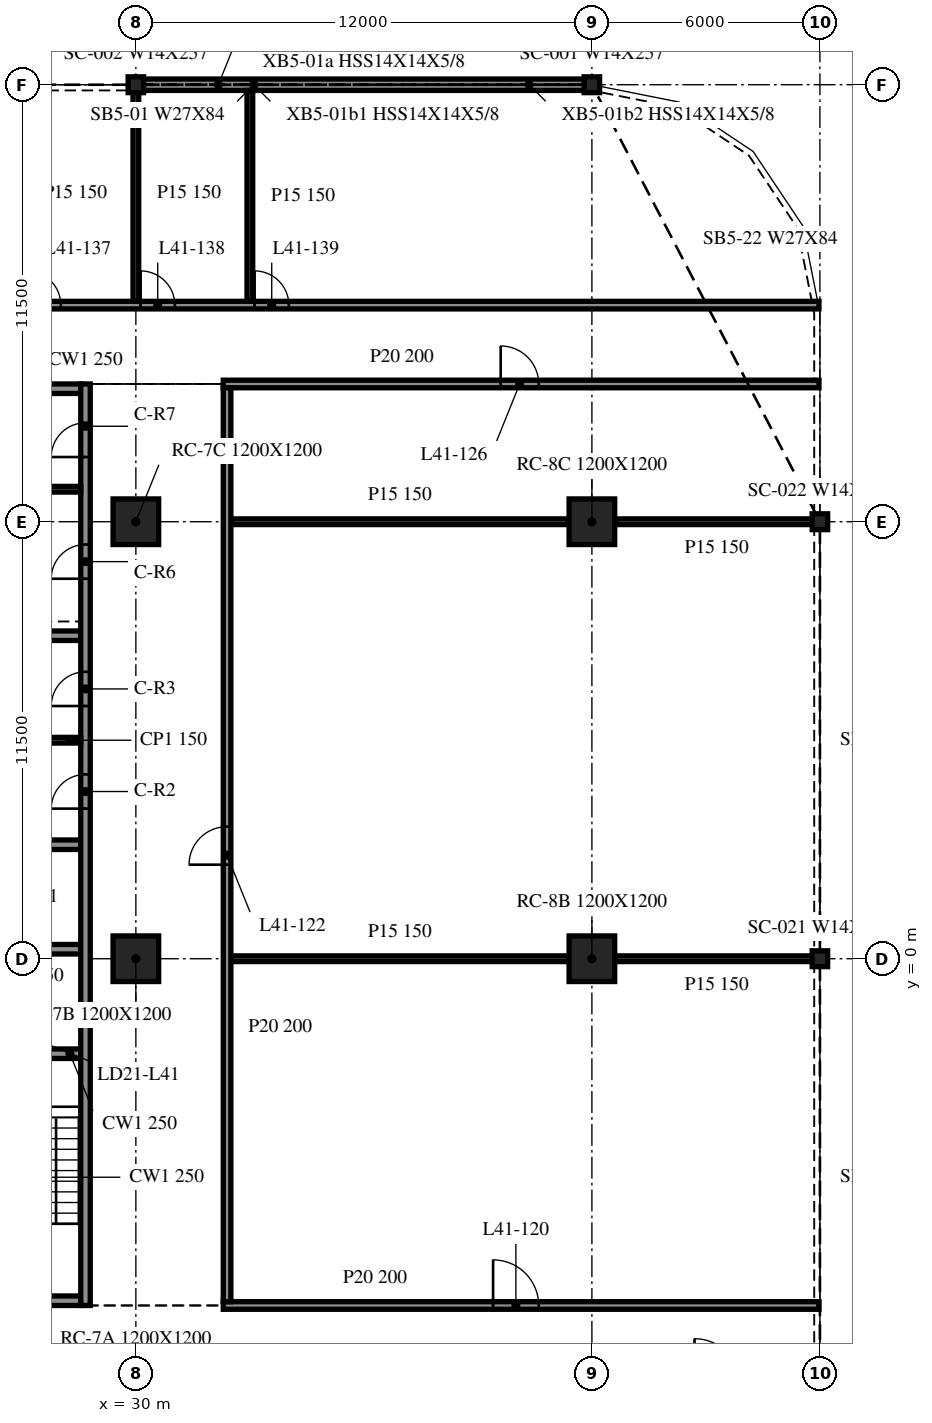
"""IFC4 building model, lengths in metres.
Left out: names, types, materials, properties, quantities, classifications, styles, units other than length and angle.
Written with IfcOpenShell. Run it as: python <this file> out.ifc"""

import sys

from ifc_helpers import new_model, si_unit, direction, frame, frame_2d, origin, origin_2d, place, context, subcontext, project, spatial, rectangle, i_section, extrude, element, fill, save


model = new_model("IFC4")
c1 = context("Model", 3, precision=1e-05, world=origin(), true_north=direction((0.0, 1.0)))
c2 = subcontext(c1, "Body", "Model", "MODEL_VIEW")
j1 = project(units=[si_unit("LENGTHUNIT", "METRE"), si_unit("PLANEANGLEUNIT", "RADIAN")], contexts=[c1])
p1 = place(None, origin())
s1 = spatial("IfcSite", under=j1, at=p1, CompositionType="ELEMENT")
p2 = place(p1, origin())
s2 = spatial("IfcBuilding", under=s1, at=p2, CompositionType="ELEMENT")
p3 = place(p2, frame((0.0, 0.0, 174.4)))
s3 = spatial("IfcBuildingStorey", under=s2, at=p3, CompositionType="ELEMENT", Elevation=174.4)
for number, where, z_axis, x_axis in (
    (1, (30.0, 0.0, -0.34), (0.0, 0.0, 1.0), (1.0, 0.0, 0.0)),
    (2, (30.0, 11.5, -0.34), (0.0, 0.0, 1.0), (1.0, 0.0, 0.0)),
    (3, (42.0, 0.0, -0.34), (0.0, 0.0, 1.0), (1.0, 0.0, 0.0)),
    (4, (42.0, 11.5, -0.34), (0.0, 0.0, 1.0), (1.0, 0.0, 0.0)),
):
    element("IfcColumn", number, at=place(p3, frame(where, z_axis=z_axis, x_axis=x_axis)), inside=s3, PredefinedType="COLUMN", context=c2, shape_type="SweptSolid", body=[
        extrude(rectangle(XDim=1.2, YDim=1.2, at=origin_2d()), origin(), (0.0, 0.0, 1.0), 3.8),
    ])
for number, where, z_axis, x_axis in (
    (5, (42.0, 23.0, -0.34), (0.0, 0.0, 1.0), (1.0, 0.0, 0.0)),
    (6, (30.0, 23.0, -0.34), (0.0, 0.0, 1.0), (1.0, 0.0, 0.0)),
    (7, (48.0, 0.0, -0.34), (0.0, 0.0, 1.0), (1.0, 0.0, 0.0)),
    (8, (48.0, 11.5, -0.34), (0.0, 0.0, 1.0), (1.0, 0.0, 0.0)),
):
    element("IfcColumn", number, at=place(p3, frame(where, z_axis=z_axis, x_axis=x_axis)), inside=s3, PredefinedType="COLUMN", context=c2, shape_type="SweptSolid", body=[
        extrude(i_section(OverallWidth=0.406, OverallDepth=0.417, WebThickness=0.03, FlangeThickness=0.048, at=origin_2d()), origin(), (0.0, 0.0, 1.0), 3.8),
    ])
p4 = place(p3, frame((41.985, 23.0, 0.0), z_axis=(0.0, 0.0, 1.0), x_axis=(-1.0, 0.0, 0.0)))
e9 = element("IfcWall", 9, at=p4, inside=s3, PredefinedType="NOTDEFINED", context=c2, shape_type="SweptSolid", body=[
    extrude(rectangle(XDim=11.97, YDim=0.3, at=frame_2d((5.985, 0.0))), origin(), (0.0, 0.0, 1.0), 2.782),
])
p5 = place(p3, frame((28.675, -9.125, 0.0), z_axis=(0.0, 0.0, 1.0), x_axis=(0.0, 1.0, 0.0)))
e10 = element("IfcWall", 10, at=p5, inside=s3, PredefinedType="SOLIDWALL", context=c2, shape_type="SweptSolid", body=[
    extrude(rectangle(XDim=24.25, YDim=0.25, at=frame_2d((12.125, 0.0))), origin(), (0.0, 0.0, 1.0), 3.46),
])
p6 = place(p5, frame((13.075, 0.0, 0.0)))
e11 = element("IfcOpeningElement", 11, at=p6, cuts=e10, PredefinedType="OPENING", context=c2, shape_type="SweptSolid", body=[
    extrude(rectangle(XDim=0.9, YDim=2.1, at=frame_2d((0.45, 1.05))), frame((0.0, 0.135, 0.0), z_axis=(0.0, -1.0, 0.0), x_axis=(1.0, 0.0, 0.0)), (0.0, 0.0, 1.0), 0.27),
])
p7 = place(p5, frame((15.775, 0.0, 0.0)))
e12 = element("IfcOpeningElement", 12, at=p7, cuts=e10, PredefinedType="OPENING", context=c2, shape_type="SweptSolid", body=[
    extrude(rectangle(XDim=0.9, YDim=2.1, at=frame_2d((0.45, 1.05))), frame((0.0, 0.135, 0.0), z_axis=(0.0, -1.0, 0.0), x_axis=(1.0, 0.0, 0.0)), (0.0, 0.0, 1.0), 0.27),
])
p8 = place(p5, frame((19.125, 0.0, 0.0)))
e13 = element("IfcOpeningElement", 13, at=p8, cuts=e10, PredefinedType="OPENING", context=c2, shape_type="SweptSolid", body=[
    extrude(rectangle(XDim=0.9, YDim=2.1, at=frame_2d((0.45, 1.05))), frame((0.0, 0.135, 0.0), z_axis=(0.0, -1.0, 0.0), x_axis=(1.0, 0.0, 0.0)), (0.0, 0.0, 1.0), 0.27),
])
p9 = place(p5, frame((22.327, 0.0, 0.0)))
e14 = element("IfcOpeningElement", 14, at=p9, cuts=e10, PredefinedType="OPENING", context=c2, shape_type="SweptSolid", body=[
    extrude(rectangle(XDim=0.9, YDim=2.1, at=frame_2d((0.45, 1.05))), frame((0.0, 0.135, 0.0), z_axis=(0.0, -1.0, 0.0), x_axis=(1.0, 0.0, 0.0)), (0.0, 0.0, 1.0), 0.27),
])
p10 = place(p3, frame((28.55, -9.0, 0.0), z_axis=(0.0, 0.0, 1.0), x_axis=(-1.0, 0.0, 0.0)))
e15 = element("IfcWall", 15, at=p10, inside=s3, PredefinedType="SOLIDWALL", context=c2, shape_type="SweptSolid", body=[
    extrude(rectangle(XDim=9.1, YDim=0.25, at=frame_2d((4.55, 0.0))), origin(), (0.0, 0.0, 1.0), 3.46),
])
p11 = place(p10, frame((3.65, 0.0, 0.0)))
e16 = element("IfcOpeningElement", 16, at=p11, cuts=e15, PredefinedType="OPENING", context=c2, shape_type="SweptSolid", body=[
    extrude(rectangle(XDim=1.8, YDim=2.1, at=frame_2d((0.9, 1.05))), frame((0.0, 0.135, 0.0), z_axis=(0.0, -1.0, 0.0), x_axis=(1.0, 0.0, 0.0)), (0.0, 0.0, 1.0), 0.27),
])
p12 = place(p3, frame((19.45, 15.0, 0.0), z_axis=(0.0, 0.0, 1.0), x_axis=(1.0, 0.0, 0.0)))
e17 = element("IfcWall", 17, at=p12, inside=s3, PredefinedType="SOLIDWALL", context=c2, shape_type="SweptSolid", body=[
    extrude(rectangle(XDim=9.1, YDim=0.25, at=frame_2d((4.55, 0.0))), origin(), (0.0, 0.0, 1.0), 3.46),
])
p13 = place(p12, frame((3.65, 0.0, 0.0)))
e18 = element("IfcOpeningElement", 18, at=p13, cuts=e17, PredefinedType="OPENING", context=c2, shape_type="SweptSolid", body=[
    extrude(rectangle(XDim=1.8, YDim=2.1, at=frame_2d((0.9, 1.05))), frame((0.0, 0.135, 0.0), z_axis=(0.0, -1.0, 0.0), x_axis=(1.0, 0.0, 0.0)), (0.0, 0.0, 1.0), 0.27),
])
for number, where, z_axis, x_axis in (
    (19, (25.7, -2.5, 0.0), (0.0, 0.0, 1.0), (1.0, 0.0, 0.0)),
    (20, (25.7, 0.25, 0.0), (0.0, 0.0, 1.0), (1.0, 0.0, 0.0)),
    (21, (25.7, 3.0, 0.0), (0.0, 0.0, 1.0), (1.0, 0.0, 0.0)),
    (22, (25.7, 8.5, 0.0), (0.0, 0.0, 1.0), (1.0, 0.0, 0.0)),
):
    element("IfcWall", number, at=place(p3, frame(where, z_axis=z_axis, x_axis=x_axis)), inside=s3, PredefinedType="SOLIDWALL", context=c2, shape_type="SweptSolid", body=[
        extrude(rectangle(XDim=2.85, YDim=0.25, at=frame_2d((1.425, 0.0))), origin(), (0.0, 0.0, 1.0), 3.46),
    ])
for number, where, z_axis, x_axis in (
    (23, (25.7, 5.75, 0.0), (0.0, 0.0, 1.0), (1.0, 0.0, 0.0)),
    (24, (25.7, 12.355, 0.0), (0.0, 0.0, 1.0), (1.0, 0.0, 0.0)),
):
    element("IfcWall", number, at=place(p3, frame(where, z_axis=z_axis, x_axis=x_axis)), inside=s3, PredefinedType="PARTITIONING", context=c2, shape_type="SweptSolid", body=[
        extrude(rectangle(XDim=2.85, YDim=0.15, at=frame_2d((1.425, 0.0))), origin(), (0.0, 0.0, 1.0), 3.46),
    ])
p14 = place(p3, frame((32.3, -9.125, 0.0), z_axis=(0.0, 0.0, 1.0), x_axis=(1.0, 0.0, 0.0)))
e25 = element("IfcWall", 25, at=p14, inside=s3, PredefinedType="PARTITIONING", context=c2, shape_type="SweptSolid", body=[
    extrude(rectangle(XDim=15.675, YDim=0.2, at=frame_2d((7.837, 0.0))), origin(), (0.0, 0.0, 1.0), 3.46),
])
p15 = place(p14, frame((7.1, 0.0, 0.0)))
e26 = element("IfcOpeningElement", 26, at=p15, cuts=e25, PredefinedType="OPENING", context=c2, shape_type="SweptSolid", body=[
    extrude(rectangle(XDim=1.2, YDim=2.1, at=frame_2d((0.6, 1.05))), frame((0.0, 0.11, 0.0), z_axis=(0.0, -1.0, 0.0), x_axis=(1.0, 0.0, 0.0)), (0.0, 0.0, 1.0), 0.22),
])
p16 = place(p3, frame((32.5, 0.0, 0.0), z_axis=(0.0, 0.0, 1.0), x_axis=(1.0, 0.0, 0.0)))
e27 = element("IfcWall", 27, at=p16, inside=s3, PredefinedType="PARTITIONING", context=c2, shape_type="SweptSolid", body=[
    extrude(rectangle(XDim=8.9, YDim=0.15, at=frame_2d((4.45, 0.0))), origin(), (0.0, 0.0, 1.0), 3.46),
])
p17 = place(p3, frame((42.6, 0.0, 0.0), z_axis=(0.0, 0.0, 1.0), x_axis=(1.0, 0.0, 0.0)))
e28 = element("IfcWall", 28, at=p17, inside=s3, PredefinedType="PARTITIONING", context=c2, shape_type="SweptSolid", body=[
    extrude(rectangle(XDim=5.375, YDim=0.15, at=frame_2d((2.688, 0.0))), origin(), (0.0, 0.0, 1.0), 3.46),
])
p18 = place(p3, frame((32.5, 11.5, 0.0), z_axis=(0.0, 0.0, 1.0), x_axis=(1.0, 0.0, 0.0)))
e29 = element("IfcWall", 29, at=p18, inside=s3, PredefinedType="PARTITIONING", context=c2, shape_type="SweptSolid", body=[
    extrude(rectangle(XDim=8.9, YDim=0.15, at=frame_2d((4.45, 0.0))), origin(), (0.0, 0.0, 1.0), 3.46),
])
p19 = place(p3, frame((42.6, 11.5, 0.0), z_axis=(0.0, 0.0, 1.0), x_axis=(1.0, 0.0, 0.0)))
e30 = element("IfcWall", 30, at=p19, inside=s3, PredefinedType="PARTITIONING", context=c2, shape_type="SweptSolid", body=[
    extrude(rectangle(XDim=5.375, YDim=0.15, at=frame_2d((2.688, 0.0))), origin(), (0.0, 0.0, 1.0), 3.46),
])
p20 = place(p3, frame((32.3, 15.125, 0.0), z_axis=(0.0, 0.0, 1.0), x_axis=(1.0, 0.0, 0.0)))
e31 = element("IfcWall", 31, at=p20, inside=s3, PredefinedType="PARTITIONING", context=c2, shape_type="SweptSolid", body=[
    extrude(rectangle(XDim=15.675, YDim=0.2, at=frame_2d((7.837, 0.0))), origin(), (0.0, 0.0, 1.0), 3.46),
])
p21 = place(p20, frame((7.3, 0.0, 0.0)))
e32 = element("IfcOpeningElement", 32, at=p21, cuts=e31, PredefinedType="OPENING", context=c2, shape_type="SweptSolid", body=[
    extrude(rectangle(XDim=1.0, YDim=2.1, at=frame_2d((0.5, 1.05))), frame((0.0, 0.11, 0.0), z_axis=(0.0, -1.0, 0.0), x_axis=(1.0, 0.0, 0.0)), (0.0, 0.0, 1.0), 0.22),
])
p22 = place(p3, frame((-47.975, 17.2, 0.0), z_axis=(0.0, 0.0, 1.0), x_axis=(1.0, 0.0, 0.0)))
e33 = element("IfcWall", 33, at=p22, inside=s3, PredefinedType="PARTITIONING", context=c2, shape_type="SweptSolid", body=[
    extrude(rectangle(XDim=95.95, YDim=0.2, at=frame_2d((47.975, 0.0))), origin(), (0.0, 0.0, 1.0), 3.46),
])
p23 = place(p22, frame((13.7, 0.0, 0.0)))
e34 = element("IfcOpeningElement", 34, at=p23, cuts=e33, PredefinedType="OPENING", context=c2, shape_type="SweptSolid", body=[
    extrude(rectangle(XDim=0.9, YDim=2.1, at=frame_2d((0.45, 1.05))), frame((0.0, 0.11, 0.0), z_axis=(0.0, -1.0, 0.0), x_axis=(1.0, 0.0, 0.0)), (0.0, 0.0, 1.0), 0.22),
])
p24 = place(p22, frame((19.7, 0.0, 0.0)))
e35 = element("IfcOpeningElement", 35, at=p24, cuts=e33, PredefinedType="OPENING", context=c2, shape_type="SweptSolid", body=[
    extrude(rectangle(XDim=0.9, YDim=2.1, at=frame_2d((0.45, 1.05))), frame((0.0, 0.11, 0.0), z_axis=(0.0, -1.0, 0.0), x_axis=(1.0, 0.0, 0.0)), (0.0, 0.0, 1.0), 0.22),
])
p25 = place(p22, frame((23.1, 0.0, 0.0)))
e36 = element("IfcOpeningElement", 36, at=p25, cuts=e33, PredefinedType="OPENING", context=c2, shape_type="SweptSolid", body=[
    extrude(rectangle(XDim=0.9, YDim=2.1, at=frame_2d((0.45, 1.05))), frame((0.0, 0.11, 0.0), z_axis=(0.0, -1.0, 0.0), x_axis=(1.0, 0.0, 0.0)), (0.0, 0.0, 1.0), 0.22),
])
p26 = place(p22, frame((25.7, 0.0, 0.0)))
e37 = element("IfcOpeningElement", 37, at=p26, cuts=e33, PredefinedType="OPENING", context=c2, shape_type="SweptSolid", body=[
    extrude(rectangle(XDim=0.9, YDim=2.1, at=frame_2d((0.45, 1.05))), frame((0.0, 0.11, 0.0), z_axis=(0.0, -1.0, 0.0), x_axis=(1.0, 0.0, 0.0)), (0.0, 0.0, 1.0), 0.22),
])
p27 = place(p22, frame((40.7, 0.0, 0.0)))
e38 = element("IfcOpeningElement", 38, at=p27, cuts=e33, PredefinedType="OPENING", context=c2, shape_type="SweptSolid", body=[
    extrude(rectangle(XDim=0.9, YDim=2.1, at=frame_2d((0.45, 1.05))), frame((0.0, 0.11, 0.0), z_axis=(0.0, -1.0, 0.0), x_axis=(1.0, 0.0, 0.0)), (0.0, 0.0, 1.0), 0.22),
])
p28 = place(p22, frame((46.7, 0.0, 0.0)))
e39 = element("IfcOpeningElement", 39, at=p28, cuts=e33, PredefinedType="OPENING", context=c2, shape_type="SweptSolid", body=[
    extrude(rectangle(XDim=0.9, YDim=2.1, at=frame_2d((0.45, 1.05))), frame((0.0, 0.11, 0.0), z_axis=(0.0, -1.0, 0.0), x_axis=(1.0, 0.0, 0.0)), (0.0, 0.0, 1.0), 0.22),
])
p29 = place(p22, frame((48.1, 0.0, 0.0)))
e40 = element("IfcOpeningElement", 40, at=p29, cuts=e33, PredefinedType="OPENING", context=c2, shape_type="SweptSolid", body=[
    extrude(rectangle(XDim=0.9, YDim=2.1, at=frame_2d((0.45, 1.05))), frame((0.0, 0.11, 0.0), z_axis=(0.0, -1.0, 0.0), x_axis=(1.0, 0.0, 0.0)), (0.0, 0.0, 1.0), 0.22),
])
p30 = place(p22, frame((51.5, 0.0, 0.0)))
e41 = element("IfcOpeningElement", 41, at=p30, cuts=e33, PredefinedType="OPENING", context=c2, shape_type="SweptSolid", body=[
    extrude(rectangle(XDim=0.9, YDim=2.1, at=frame_2d((0.45, 1.05))), frame((0.0, 0.11, 0.0), z_axis=(0.0, -1.0, 0.0), x_axis=(1.0, 0.0, 0.0)), (0.0, 0.0, 1.0), 0.22),
])
p31 = place(p22, frame((54.5, 0.0, 0.0)))
e42 = element("IfcOpeningElement", 42, at=p31, cuts=e33, PredefinedType="OPENING", context=c2, shape_type="SweptSolid", body=[
    extrude(rectangle(XDim=0.9, YDim=2.1, at=frame_2d((0.45, 1.05))), frame((0.0, 0.11, 0.0), z_axis=(0.0, -1.0, 0.0), x_axis=(1.0, 0.0, 0.0)), (0.0, 0.0, 1.0), 0.22),
])
p32 = place(p22, frame((69.1, 0.0, 0.0)))
e43 = element("IfcOpeningElement", 43, at=p32, cuts=e33, PredefinedType="OPENING", context=c2, shape_type="SweptSolid", body=[
    extrude(rectangle(XDim=0.9, YDim=2.1, at=frame_2d((0.45, 1.05))), frame((0.0, 0.11, 0.0), z_axis=(0.0, -1.0, 0.0), x_axis=(1.0, 0.0, 0.0)), (0.0, 0.0, 1.0), 0.22),
])
p33 = place(p22, frame((75.1, 0.0, 0.0)))
e44 = element("IfcOpeningElement", 44, at=p33, cuts=e33, PredefinedType="OPENING", context=c2, shape_type="SweptSolid", body=[
    extrude(rectangle(XDim=0.9, YDim=2.1, at=frame_2d((0.45, 1.05))), frame((0.0, 0.11, 0.0), z_axis=(0.0, -1.0, 0.0), x_axis=(1.0, 0.0, 0.0)), (0.0, 0.0, 1.0), 0.22),
])
p34 = place(p22, frame((78.1, 0.0, 0.0)))
e45 = element("IfcOpeningElement", 45, at=p34, cuts=e33, PredefinedType="OPENING", context=c2, shape_type="SweptSolid", body=[
    extrude(rectangle(XDim=0.9, YDim=2.1, at=frame_2d((0.45, 1.05))), frame((0.0, 0.11, 0.0), z_axis=(0.0, -1.0, 0.0), x_axis=(1.0, 0.0, 0.0)), (0.0, 0.0, 1.0), 0.22),
])
p35 = place(p22, frame((81.1, 0.0, 0.0)))
e46 = element("IfcOpeningElement", 46, at=p35, cuts=e33, PredefinedType="OPENING", context=c2, shape_type="SweptSolid", body=[
    extrude(rectangle(XDim=0.9, YDim=2.1, at=frame_2d((0.45, 1.05))), frame((0.0, 0.11, 0.0), z_axis=(0.0, -1.0, 0.0), x_axis=(1.0, 0.0, 0.0)), (0.0, 0.0, 1.0), 0.22),
])
p36 = place(p3, frame((30.0, 17.3, 0.0), z_axis=(0.0, 0.0, 1.0), x_axis=(0.0, 1.0, 0.0)))
e47 = element("IfcWall", 47, at=p36, inside=s3, PredefinedType="PARTITIONING", context=c2, shape_type="SweptSolid", body=[
    extrude(rectangle(XDim=5.675, YDim=0.15, at=frame_2d((2.837, 0.0))), origin(), (0.0, 0.0, 1.0), 3.46),
])
p37 = place(p3, frame((32.4, -9.025, 0.0), z_axis=(0.0, 0.0, 1.0), x_axis=(0.0, 1.0, 0.0)))
e48 = element("IfcWall", 48, at=p37, inside=s3, PredefinedType="PARTITIONING", context=c2, shape_type="SweptSolid", body=[
    extrude(rectangle(XDim=24.05, YDim=0.2, at=frame_2d((12.025, 0.0))), origin(), (0.0, 0.0, 1.0), 3.46),
])
p38 = place(p37, frame((11.5, 0.0, 0.0)))
e49 = element("IfcOpeningElement", 49, at=p38, cuts=e48, PredefinedType="OPENING", context=c2, shape_type="SweptSolid", body=[
    extrude(rectangle(XDim=1.0, YDim=2.1, at=frame_2d((0.5, 1.05))), frame((0.0, 0.11, 0.0), z_axis=(0.0, -1.0, 0.0), x_axis=(1.0, 0.0, 0.0)), (0.0, 0.0, 1.0), 0.22),
])
p39 = place(p3, frame((33.0, 17.3, 0.0), z_axis=(0.0, 0.0, 1.0), x_axis=(0.0, 1.0, 0.0)))
e50 = element("IfcWall", 50, at=p39, inside=s3, PredefinedType="PARTITIONING", context=c2, shape_type="SweptSolid", body=[
    extrude(rectangle(XDim=5.55, YDim=0.15, at=frame_2d((2.775, 0.0))), origin(), (0.0, 0.0, 1.0), 3.46),
])
p40 = place(p6, origin())
e51 = element("IfcDoor", 51, at=p40, inside=s3, OperationType="SINGLE_SWING_RIGHT", PredefinedType="DOOR", context=c2, shape_type="SweptSolid", body=[
    extrude(rectangle(XDim=0.9, YDim=2.1, at=frame_2d((0.45, 1.05))), frame((0.0, 0.025, 0.0), z_axis=(0.0, -1.0, 0.0), x_axis=(1.0, 0.0, 0.0)), (0.0, 0.0, 1.0), 0.05),
])
fill(e11, e51)
p41 = place(p7, origin())
e52 = element("IfcDoor", 52, at=p41, inside=s3, OperationType="SINGLE_SWING_LEFT", PredefinedType="DOOR", context=c2, shape_type="SweptSolid", body=[
    extrude(rectangle(XDim=0.9, YDim=2.1, at=frame_2d((0.45, 1.05))), frame((0.0, 0.025, 0.0), z_axis=(0.0, -1.0, 0.0), x_axis=(1.0, 0.0, 0.0)), (0.0, 0.0, 1.0), 0.05),
])
fill(e12, e52)
p42 = place(p8, origin())
e53 = element("IfcDoor", 53, at=p42, inside=s3, OperationType="SINGLE_SWING_RIGHT", PredefinedType="DOOR", context=c2, shape_type="SweptSolid", body=[
    extrude(rectangle(XDim=0.9, YDim=2.1, at=frame_2d((0.45, 1.05))), frame((0.0, 0.025, 0.0), z_axis=(0.0, -1.0, 0.0), x_axis=(1.0, 0.0, 0.0)), (0.0, 0.0, 1.0), 0.05),
])
fill(e13, e53)
p43 = place(p9, origin())
e54 = element("IfcDoor", 54, at=p43, inside=s3, OperationType="SINGLE_SWING_LEFT", PredefinedType="DOOR", context=c2, shape_type="SweptSolid", body=[
    extrude(rectangle(XDim=0.9, YDim=2.1, at=frame_2d((0.45, 1.05))), frame((0.0, 0.025, 0.0), z_axis=(0.0, -1.0, 0.0), x_axis=(1.0, 0.0, 0.0)), (0.0, 0.0, 1.0), 0.05),
])
fill(e14, e54)
p44 = place(p15, origin())
e55 = element("IfcDoor", 55, at=p44, inside=s3, OperationType="SINGLE_SWING_LEFT", PredefinedType="DOOR", context=c2, shape_type="SweptSolid", body=[
    extrude(rectangle(XDim=1.2, YDim=2.1, at=frame_2d((0.6, 1.05))), frame((0.0, 0.025, 0.0), z_axis=(0.0, -1.0, 0.0), x_axis=(1.0, 0.0, 0.0)), (0.0, 0.0, 1.0), 0.05),
])
fill(e26, e55)
p45 = place(p38, origin())
e56 = element("IfcDoor", 56, at=p45, inside=s3, OperationType="SINGLE_SWING_RIGHT", PredefinedType="DOOR", context=c2, shape_type="SweptSolid", body=[
    extrude(rectangle(XDim=1.0, YDim=2.1, at=frame_2d((0.5, 1.05))), frame((0.0, 0.025, 0.0), z_axis=(0.0, -1.0, 0.0), x_axis=(1.0, 0.0, 0.0)), (0.0, 0.0, 1.0), 0.05),
])
fill(e49, e56)
p46 = place(p21, origin())
e57 = element("IfcDoor", 57, at=p46, inside=s3, OperationType="SINGLE_SWING_LEFT", PredefinedType="DOOR", context=c2, shape_type="SweptSolid", body=[
    extrude(rectangle(XDim=1.0, YDim=2.1, at=frame_2d((0.5, 1.05))), frame((0.0, 0.025, 0.0), z_axis=(0.0, -1.0, 0.0), x_axis=(1.0, 0.0, 0.0)), (0.0, 0.0, 1.0), 0.05),
])
fill(e32, e57)
p47 = place(p33, origin())
e58 = element("IfcDoor", 58, at=p47, inside=s3, OperationType="SINGLE_SWING_RIGHT", PredefinedType="DOOR", context=c2, shape_type="SweptSolid", body=[
    extrude(rectangle(XDim=0.9, YDim=2.1, at=frame_2d((0.45, 1.05))), frame((0.0, 0.025, 0.0), z_axis=(0.0, -1.0, 0.0), x_axis=(1.0, 0.0, 0.0)), (0.0, 0.0, 1.0), 0.05),
])
fill(e44, e58)
p48 = place(p34, origin())
e59 = element("IfcDoor", 59, at=p48, inside=s3, OperationType="SINGLE_SWING_RIGHT", PredefinedType="DOOR", context=c2, shape_type="SweptSolid", body=[
    extrude(rectangle(XDim=0.9, YDim=2.1, at=frame_2d((0.45, 1.05))), frame((0.0, 0.025, 0.0), z_axis=(0.0, -1.0, 0.0), x_axis=(1.0, 0.0, 0.0)), (0.0, 0.0, 1.0), 0.05),
])
fill(e45, e59)
p49 = place(p35, origin())
e60 = element("IfcDoor", 60, at=p49, inside=s3, OperationType="SINGLE_SWING_RIGHT", PredefinedType="DOOR", context=c2, shape_type="SweptSolid", body=[
    extrude(rectangle(XDim=0.9, YDim=2.1, at=frame_2d((0.45, 1.05))), frame((0.0, 0.025, 0.0), z_axis=(0.0, -1.0, 0.0), x_axis=(1.0, 0.0, 0.0)), (0.0, 0.0, 1.0), 0.05),
])
fill(e46, e60)
save(model, sys.argv[1])
